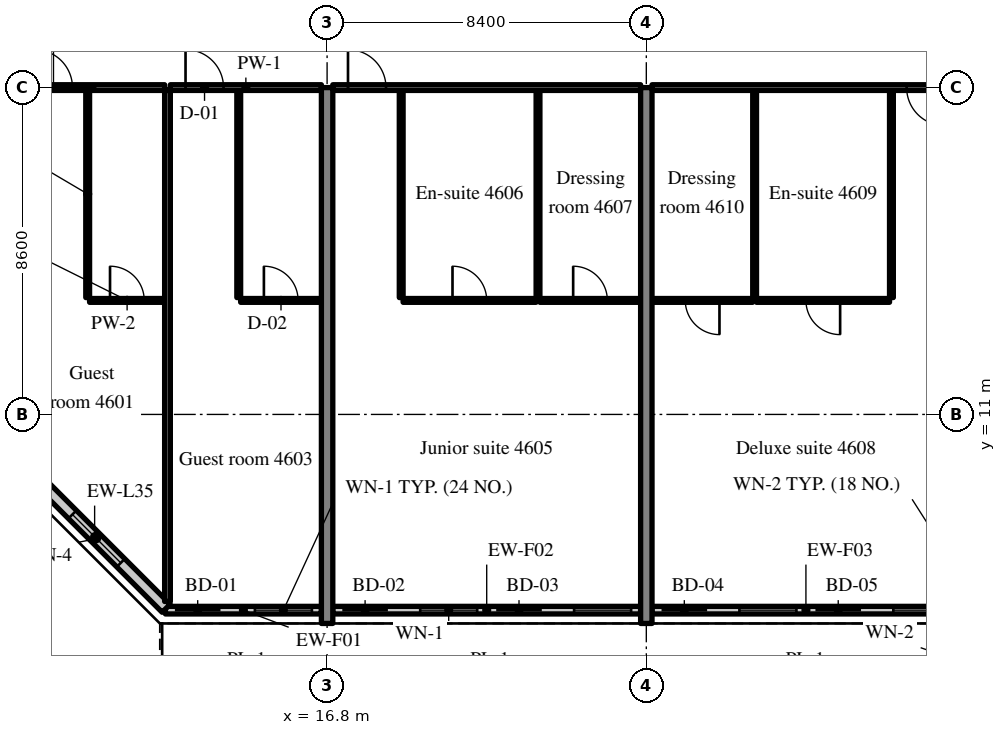
"""IFC4 building model, lengths in metres.
Left out: names, types, materials, properties, quantities, classifications, styles, units other than length and angle.
Written with IfcOpenShell. Run it as: python <this file> out.ifc"""

import sys

from ifc_helpers import new_model, si_unit, direction, frame, frame_2d, origin, place, context, subcontext, project, spatial, rectangle, extrude, source, transform, mapped, element, fill, save


model = new_model("IFC4")
c1 = context("Model", 3, precision=1e-05, world=origin(), true_north=direction((0.0, 1.0)))
c2 = subcontext(c1, "Body", "Model", "MODEL_VIEW")
j1 = project(units=[si_unit("LENGTHUNIT", "METRE"), si_unit("PLANEANGLEUNIT", "RADIAN")], contexts=[c1])
p1 = place(None, origin())
s1 = spatial("IfcSite", under=j1, at=p1, CompositionType="ELEMENT")
p2 = place(p1, origin())
s2 = spatial("IfcBuilding", under=s1, at=p2, CompositionType="ELEMENT")
p3 = place(p2, frame((0.0, 0.0, 189.6)))
s3 = spatial("IfcBuildingStorey", under=s2, at=p3, CompositionType="ELEMENT", Elevation=189.6)
m1 = source(origin(), c2, "Body", "SweptSolid", [
    extrude(rectangle(XDim=14.1, YDim=0.3, at=frame_2d((7.05, 0.0))), origin(), (0.0, 0.0, 1.0), 3.52),
])
for number, where, z_axis, x_axis in (
    (1, (16.8, 5.5, 0.0), (0.0, 0.0, 1.0), (0.0, 1.0, 0.0)),
    (2, (25.2, 5.5, 0.0), (0.0, 0.0, 1.0), (0.0, 1.0, 0.0)),
):
    element("IfcWall", number, at=place(p3, frame(where, z_axis=z_axis, x_axis=x_axis)), inside=s3, PredefinedType="SHEAR", context=c2, shape_type="MappedRepresentation", body=[
        mapped(m1, transform((0.0, 0.0, 0.0), scale=1.0)),
    ])
m2 = source(origin(), c2, "Body", "SweptSolid", [
    extrude(rectangle(XDim=4.105, YDim=0.2, at=frame_2d((2.052, 0.0))), origin(), (0.0, 0.0, 1.0), 2.87),
])
p4 = place(p3, frame((12.545, 5.85, 0.0), z_axis=(0.0, 0.0, 1.0), x_axis=(1.0, 0.0, 0.0)))
e3 = element("IfcWall", 3, at=p4, inside=s3, PredefinedType="SOLIDWALL", context=c2, shape_type="MappedRepresentation", body=[
    mapped(m2, transform((0.0, 0.0, 0.0), scale=1.0)),
])
m3 = source(origin(), c2, "Body", "SweptSolid", [
    extrude(rectangle(XDim=1.2, YDim=2.4, at=frame_2d((0.6, 1.2))), frame((0.0, 0.11, 0.0), z_axis=(0.0, -1.0, 0.0), x_axis=(1.0, 0.0, 0.0)), (0.0, 0.0, 1.0), 0.22),
])
p5 = place(p4, frame((0.25, 0.0, 0.0)))
e4 = element("IfcOpeningElement", 4, at=p5, cuts=e3, PredefinedType="OPENING", context=c2, shape_type="MappedRepresentation", body=[
    mapped(m3, transform((0.0, 0.0, 0.0), scale=1.0)),
])
m4 = source(origin(), c2, "Body", "SweptSolid", [
    extrude(rectangle(XDim=1.5, YDim=1.5, at=frame_2d((0.75, 0.75))), frame((0.0, 0.11, 0.0), z_axis=(0.0, -1.0, 0.0), x_axis=(1.0, 0.0, 0.0)), (0.0, 0.0, 1.0), 0.22),
])
p6 = place(p4, frame((2.355, 0.0, 0.9)))
e5 = element("IfcOpeningElement", 5, at=p6, cuts=e3, PredefinedType="OPENING", context=c2, shape_type="MappedRepresentation", body=[
    mapped(m4, transform((0.0, 0.0, 0.0), scale=1.0)),
])
m5 = source(origin(), c2, "Body", "SweptSolid", [
    extrude(rectangle(XDim=8.1, YDim=0.2, at=frame_2d((4.05, 0.0))), origin(), (0.0, 0.0, 1.0), 2.87),
])
p7 = place(p3, frame((16.95, 5.85, 0.0), z_axis=(0.0, 0.0, 1.0), x_axis=(1.0, 0.0, 0.0)))
e6 = element("IfcWall", 6, at=p7, inside=s3, PredefinedType="SOLIDWALL", context=c2, shape_type="MappedRepresentation", body=[
    mapped(m5, transform((0.0, 0.0, 0.0), scale=1.0)),
])
p8 = place(p7, frame((0.25, 0.0, 0.0)))
e7 = element("IfcOpeningElement", 7, at=p8, cuts=e6, PredefinedType="OPENING", context=c2, shape_type="MappedRepresentation", body=[
    mapped(m3, transform((0.0, 0.0, 0.0), scale=1.0)),
])
p9 = place(p7, frame((2.3, 0.0, 0.9)))
e8 = element("IfcOpeningElement", 8, at=p9, cuts=e6, PredefinedType="OPENING", context=c2, shape_type="MappedRepresentation", body=[
    mapped(m4, transform((0.0, 0.0, 0.0), scale=1.0)),
])
p10 = place(p7, frame((4.3, 0.0, 0.0)))
e9 = element("IfcOpeningElement", 9, at=p10, cuts=e6, PredefinedType="OPENING", context=c2, shape_type="MappedRepresentation", body=[
    mapped(m3, transform((0.0, 0.0, 0.0), scale=1.0)),
])
p11 = place(p7, frame((6.35, 0.0, 0.9)))
e10 = element("IfcOpeningElement", 10, at=p11, cuts=e6, PredefinedType="OPENING", context=c2, shape_type="MappedRepresentation", body=[
    mapped(m4, transform((0.0, 0.0, 0.0), scale=1.0)),
])
m6 = source(origin(), c2, "Body", "SweptSolid", [
    extrude(rectangle(XDim=8.1, YDim=0.2, at=frame_2d((4.05, 0.0))), origin(), (0.0, 0.0, 1.0), 2.87),
])
p12 = place(p3, frame((25.35, 5.85, 0.0), z_axis=(0.0, 0.0, 1.0), x_axis=(1.0, 0.0, 0.0)))
e11 = element("IfcWall", 11, at=p12, inside=s3, PredefinedType="SOLIDWALL", context=c2, shape_type="MappedRepresentation", body=[
    mapped(m6, transform((0.0, 0.0, 0.0), scale=1.0)),
])
p13 = place(p12, frame((0.25, 0.0, 0.0)))
e12 = element("IfcOpeningElement", 12, at=p13, cuts=e11, PredefinedType="OPENING", context=c2, shape_type="MappedRepresentation", body=[
    mapped(m3, transform((0.0, 0.0, 0.0), scale=1.0)),
])
p14 = place(p12, frame((2.3, 0.0, 0.9)))
e13 = element("IfcOpeningElement", 13, at=p14, cuts=e11, PredefinedType="OPENING", context=c2, shape_type="MappedRepresentation", body=[
    mapped(m4, transform((0.0, 0.0, 0.0), scale=1.0)),
])
p15 = place(p12, frame((4.3, 0.0, 0.0)))
e14 = element("IfcOpeningElement", 14, at=p15, cuts=e11, PredefinedType="OPENING", context=c2, shape_type="MappedRepresentation", body=[
    mapped(m3, transform((0.0, 0.0, 0.0), scale=1.0)),
])
p16 = place(p12, frame((6.35, 0.0, 0.9)))
e15 = element("IfcOpeningElement", 15, at=p16, cuts=e11, PredefinedType="OPENING", context=c2, shape_type="MappedRepresentation", body=[
    mapped(m4, transform((0.0, 0.0, 0.0), scale=1.0)),
])
m7 = source(origin(), c2, "Body", "SweptSolid", [
    extrude(rectangle(XDim=5.326, YDim=0.3, at=frame_2d((2.663, 0.0))), origin(), (0.0, 0.0, 1.0), 3.52),
])
p17 = place(p3, frame((8.8, 9.666, 0.0), z_axis=(0.0, 0.0, 1.0), x_axis=(0.707083859269, -0.707129702361, 0.0)))
e16 = element("IfcWall", 16, at=p17, inside=s3, PredefinedType="SOLIDWALL", context=c2, shape_type="MappedRepresentation", body=[
    mapped(m7, transform((0.0, 0.0, 0.0), scale=1.0)),
])
m8 = source(origin(), c2, "Body", "SweptSolid", [
    extrude(rectangle(XDim=1.8, YDim=1.5, at=frame_2d((0.9, 0.75))), frame((0.0, 0.16, 0.0), z_axis=(0.0, -1.0, 0.0), x_axis=(1.0, 0.0, 0.0)), (0.0, 0.0, 1.0), 0.32),
])
p18 = place(p17, frame((1.836, 0.0, 0.9)))
e17 = element("IfcOpeningElement", 17, at=p18, cuts=e16, PredefinedType="OPENING", context=c2, shape_type="MappedRepresentation", body=[
    mapped(m8, transform((0.0, 0.0, 0.0), scale=1.0)),
])
m9 = source(origin(), c2, "Body", "SweptSolid", [
    extrude(rectangle(XDim=5.45, YDim=0.1, at=frame_2d((2.725, 0.0))), origin(), (0.0, 0.0, 1.0), 3.52),
])
p19 = place(p3, frame((10.5, 14.075, 0.0), z_axis=(0.0, 0.0, 1.0), x_axis=(0.0, 1.0, 0.0)))
e18 = element("IfcWall", 18, at=p19, inside=s3, PredefinedType="PARTITIONING", context=c2, shape_type="MappedRepresentation", body=[
    mapped(m9, transform((0.0, 0.0, 0.0), scale=1.0)),
])
m10 = source(origin(), c2, "Body", "SweptSolid", [
    extrude(rectangle(XDim=1.975, YDim=0.1, at=frame_2d((0.987, 0.0))), origin(), (0.0, 0.0, 1.0), 3.52),
])
p20 = place(p3, frame((10.55, 14.0, 0.0), z_axis=(0.0, 0.0, 1.0), x_axis=(1.0, 0.0, 0.0)))
e19 = element("IfcWall", 19, at=p20, inside=s3, PredefinedType="PARTITIONING", context=c2, shape_type="MappedRepresentation", body=[
    mapped(m10, transform((0.0, 0.0, 0.0), scale=1.0)),
])
m11 = source(origin(), c2, "Body", "SweptSolid", [
    extrude(rectangle(XDim=0.9, YDim=2.1, at=frame_2d((0.45, 1.05))), frame((0.0, 0.06, 0.0), z_axis=(0.0, -1.0, 0.0), x_axis=(1.0, 0.0, 0.0)), (0.0, 0.0, 1.0), 0.12),
])
p21 = place(p20, frame((0.538, 0.0, 0.0)))
e20 = element("IfcOpeningElement", 20, at=p21, cuts=e19, PredefinedType="OPENING", context=c2, shape_type="MappedRepresentation", body=[
    mapped(m11, transform((0.0, 0.0, 0.0), scale=1.0)),
])
m12 = source(origin(), c2, "Body", "SweptSolid", [
    extrude(rectangle(XDim=3.825, YDim=0.15, at=frame_2d((1.913, 0.0))), origin(), (0.0, 0.0, 1.0), 2.82),
])
p22 = place(p3, frame((8.7, 19.6, 0.0), z_axis=(0.0, 0.0, 1.0), x_axis=(1.0, 0.0, 0.0)))
e21 = element("IfcWall", 21, at=p22, inside=s3, PredefinedType="PARTITIONING", context=c2, shape_type="MappedRepresentation", body=[
    mapped(m12, transform((0.0, 0.0, 0.0), scale=1.0)),
])
m13 = source(origin(), c2, "Body", "SweptSolid", [
    extrude(rectangle(XDim=1.0, YDim=2.1, at=frame_2d((0.5, 1.05))), frame((0.0, 0.085, 0.0), z_axis=(0.0, -1.0, 0.0), x_axis=(1.0, 0.0, 0.0)), (0.0, 0.0, 1.0), 0.17),
])
p23 = place(p22, frame((0.4, 0.0, 0.0)))
e22 = element("IfcOpeningElement", 22, at=p23, cuts=e21, PredefinedType="OPENING", context=c2, shape_type="MappedRepresentation", body=[
    mapped(m13, transform((0.0, 0.0, 0.0), scale=1.0)),
])
p24 = place(p3, frame((14.475, 14.075, 0.0), z_axis=(0.0, 0.0, 1.0), x_axis=(0.0, 1.0, 0.0)))
e23 = element("IfcWall", 23, at=p24, inside=s3, PredefinedType="PARTITIONING", context=c2, shape_type="MappedRepresentation", body=[
    mapped(m9, transform((0.0, 0.0, 0.0), scale=1.0)),
])
m14 = source(origin(), c2, "Body", "SweptSolid", [
    extrude(rectangle(XDim=2.125, YDim=0.1, at=frame_2d((1.062, 0.0))), origin(), (0.0, 0.0, 1.0), 3.52),
])
p25 = place(p3, frame((14.525, 14.0, 0.0), z_axis=(0.0, 0.0, 1.0), x_axis=(1.0, 0.0, 0.0)))
e24 = element("IfcWall", 24, at=p25, inside=s3, PredefinedType="PARTITIONING", context=c2, shape_type="MappedRepresentation", body=[
    mapped(m14, transform((0.0, 0.0, 0.0), scale=1.0)),
])
p26 = place(p25, frame((0.612, 0.0, 0.0)))
e25 = element("IfcOpeningElement", 25, at=p26, cuts=e24, PredefinedType="OPENING", context=c2, shape_type="MappedRepresentation", body=[
    mapped(m11, transform((0.0, 0.0, 0.0), scale=1.0)),
])
m15 = source(origin(), c2, "Body", "SweptSolid", [
    extrude(rectangle(XDim=3.975, YDim=0.15, at=frame_2d((1.987, 0.0))), origin(), (0.0, 0.0, 1.0), 2.82),
])
p27 = place(p3, frame((12.675, 19.6, 0.0), z_axis=(0.0, 0.0, 1.0), x_axis=(1.0, 0.0, 0.0)))
e26 = element("IfcWall", 26, at=p27, inside=s3, PredefinedType="PARTITIONING", context=c2, shape_type="MappedRepresentation", body=[
    mapped(m15, transform((0.0, 0.0, 0.0), scale=1.0)),
])
p28 = place(p27, frame((0.4, 0.0, 0.0)))
e27 = element("IfcOpeningElement", 27, at=p28, cuts=e26, PredefinedType="OPENING", context=c2, shape_type="MappedRepresentation", body=[
    mapped(m13, transform((0.0, 0.0, 0.0), scale=1.0)),
])
m16 = source(origin(), c2, "Body", "SweptSolid", [
    extrude(rectangle(XDim=13.447, YDim=0.15, at=frame_2d((6.724, 0.0))), origin(), (0.0, 0.0, 1.0), 3.52),
])
p29 = place(p3, frame((12.6, 6.078, 0.0), z_axis=(0.0, 0.0, 1.0), x_axis=(0.0, 1.0, 0.0)))
e28 = element("IfcWall", 28, at=p29, inside=s3, PredefinedType="PARTITIONING", context=c2, shape_type="MappedRepresentation", body=[
    mapped(m16, transform((0.0, 0.0, 0.0), scale=1.0)),
])
for number, where, z_axis, x_axis in (
    (29, (18.75, 14.075, 0.0), (0.0, 0.0, 1.0), (0.0, 1.0, 0.0)),
    (30, (22.35, 14.075, 0.0), (0.0, 0.0, 1.0), (0.0, 1.0, 0.0)),
):
    element("IfcWall", number, at=place(p3, frame(where, z_axis=z_axis, x_axis=x_axis)), inside=s3, PredefinedType="PARTITIONING", context=c2, shape_type="MappedRepresentation", body=[
        mapped(m9, transform((0.0, 0.0, 0.0), scale=1.0)),
    ])
m17 = source(origin(), c2, "Body", "SweptSolid", [
    extrude(rectangle(XDim=3.5, YDim=0.1, at=frame_2d((1.75, 0.0))), origin(), (0.0, 0.0, 1.0), 3.52),
])
p30 = place(p3, frame((18.8, 14.0, 0.0), z_axis=(0.0, 0.0, 1.0), x_axis=(1.0, 0.0, 0.0)))
e31 = element("IfcWall", 31, at=p30, inside=s3, PredefinedType="PARTITIONING", context=c2, shape_type="MappedRepresentation", body=[
    mapped(m17, transform((0.0, 0.0, 0.0), scale=1.0)),
])
p31 = place(p30, frame((1.3, 0.0, 0.0)))
e32 = element("IfcOpeningElement", 32, at=p31, cuts=e31, PredefinedType="OPENING", context=c2, shape_type="MappedRepresentation", body=[
    mapped(m11, transform((0.0, 0.0, 0.0), scale=1.0)),
])
m18 = source(origin(), c2, "Body", "SweptSolid", [
    extrude(rectangle(XDim=2.65, YDim=0.1, at=frame_2d((1.325, 0.0))), origin(), (0.0, 0.0, 1.0), 3.52),
])
p32 = place(p3, frame((22.4, 14.0, 0.0), z_axis=(0.0, 0.0, 1.0), x_axis=(1.0, 0.0, 0.0)))
e33 = element("IfcWall", 33, at=p32, inside=s3, PredefinedType="PARTITIONING", context=c2, shape_type="MappedRepresentation", body=[
    mapped(m18, transform((0.0, 0.0, 0.0), scale=1.0)),
])
p33 = place(p32, frame((0.875, 0.0, 0.0)))
e34 = element("IfcOpeningElement", 34, at=p33, cuts=e33, PredefinedType="OPENING", context=c2, shape_type="MappedRepresentation", body=[
    mapped(m11, transform((0.0, 0.0, 0.0), scale=1.0)),
])
m19 = source(origin(), c2, "Body", "SweptSolid", [
    extrude(rectangle(XDim=8.1, YDim=0.15, at=frame_2d((4.05, 0.0))), origin(), (0.0, 0.0, 1.0), 2.82),
])
p34 = place(p3, frame((16.95, 19.6, 0.0), z_axis=(0.0, 0.0, 1.0), x_axis=(1.0, 0.0, 0.0)))
e35 = element("IfcWall", 35, at=p34, inside=s3, PredefinedType="PARTITIONING", context=c2, shape_type="MappedRepresentation", body=[
    mapped(m19, transform((0.0, 0.0, 0.0), scale=1.0)),
])
p35 = place(p34, frame((0.4, 0.0, 0.0)))
e36 = element("IfcOpeningElement", 36, at=p35, cuts=e35, PredefinedType="OPENING", context=c2, shape_type="MappedRepresentation", body=[
    mapped(m13, transform((0.0, 0.0, 0.0), scale=1.0)),
])
for number, where, z_axis, x_axis in (
    (37, (31.65, 14.075, 0.0), (0.0, 0.0, 1.0), (0.0, 1.0, 0.0)),
    (38, (28.05, 14.075, 0.0), (0.0, 0.0, 1.0), (0.0, 1.0, 0.0)),
):
    element("IfcWall", number, at=place(p3, frame(where, z_axis=z_axis, x_axis=x_axis)), inside=s3, PredefinedType="PARTITIONING", context=c2, shape_type="MappedRepresentation", body=[
        mapped(m9, transform((0.0, 0.0, 0.0), scale=1.0)),
    ])
p36 = place(p3, frame((28.1, 14.0, 0.0), z_axis=(0.0, 0.0, 1.0), x_axis=(1.0, 0.0, 0.0)))
e39 = element("IfcWall", 39, at=p36, inside=s3, PredefinedType="PARTITIONING", context=c2, shape_type="MappedRepresentation", body=[
    mapped(m17, transform((0.0, 0.0, 0.0), scale=1.0)),
])
p37 = place(p36, frame((1.3, 0.0, 0.0)))
e40 = element("IfcOpeningElement", 40, at=p37, cuts=e39, PredefinedType="OPENING", context=c2, shape_type="MappedRepresentation", body=[
    mapped(m11, transform((0.0, 0.0, 0.0), scale=1.0)),
])
m20 = source(origin(), c2, "Body", "SweptSolid", [
    extrude(rectangle(XDim=2.65, YDim=0.1, at=frame_2d((1.325, 0.0))), origin(), (0.0, 0.0, 1.0), 3.52),
])
p38 = place(p3, frame((25.35, 14.0, 0.0), z_axis=(0.0, 0.0, 1.0), x_axis=(1.0, 0.0, 0.0)))
e41 = element("IfcWall", 41, at=p38, inside=s3, PredefinedType="PARTITIONING", context=c2, shape_type="MappedRepresentation", body=[
    mapped(m20, transform((0.0, 0.0, 0.0), scale=1.0)),
])
p39 = place(p38, frame((0.875, 0.0, 0.0)))
e42 = element("IfcOpeningElement", 42, at=p39, cuts=e41, PredefinedType="OPENING", context=c2, shape_type="MappedRepresentation", body=[
    mapped(m11, transform((0.0, 0.0, 0.0), scale=1.0)),
])
m21 = source(origin(), c2, "Body", "SweptSolid", [
    extrude(rectangle(XDim=8.1, YDim=0.15, at=frame_2d((4.05, 0.0))), origin(), (0.0, 0.0, 1.0), 2.82),
])
p40 = place(p3, frame((25.35, 19.6, 0.0), z_axis=(0.0, 0.0, 1.0), x_axis=(1.0, 0.0, 0.0)))
e43 = element("IfcWall", 43, at=p40, inside=s3, PredefinedType="PARTITIONING", context=c2, shape_type="MappedRepresentation", body=[
    mapped(m21, transform((0.0, 0.0, 0.0), scale=1.0)),
])
p41 = place(p40, frame((6.7, 0.0, 0.0)))
e44 = element("IfcOpeningElement", 44, at=p41, cuts=e43, PredefinedType="OPENING", context=c2, shape_type="MappedRepresentation", body=[
    mapped(m13, transform((0.0, 0.0, 0.0), scale=1.0)),
])
m22 = source(origin(), c2, "Body", "SweptSolid", [
    extrude(rectangle(XDim=1.2, YDim=2.4, at=frame_2d((0.6, 1.2))), frame((0.0, 0.025, 0.0), z_axis=(0.0, -1.0, 0.0), x_axis=(1.0, 0.0, 0.0)), (0.0, 0.0, 1.0), 0.05),
])
p42 = place(p5, origin())
e45 = element("IfcDoor", 45, at=p42, inside=s3, OperationType="SLIDING_TO_LEFT", PredefinedType="DOOR", context=c2, shape_type="MappedRepresentation", body=[
    mapped(m22, transform((0.0, 0.0, 0.0), scale=1.0)),
])
fill(e4, e45)
m23 = source(origin(), c2, "Body", "SweptSolid", [
    extrude(rectangle(XDim=1.5, YDim=1.5, at=frame_2d((0.75, 0.75))), frame((0.0, 0.03, 0.0), z_axis=(0.0, -1.0, 0.0), x_axis=(1.0, 0.0, 0.0)), (0.0, 0.0, 1.0), 0.06),
])
p43 = place(p6, origin())
e46 = element("IfcWindow", 46, at=p43, inside=s3, PartitioningType="SINGLE_PANEL", PredefinedType="WINDOW", context=c2, shape_type="MappedRepresentation", body=[
    mapped(m23, transform((0.0, 0.0, 0.0), scale=1.0)),
])
fill(e5, e46)
p44 = place(p8, origin())
e47 = element("IfcDoor", 47, at=p44, inside=s3, OperationType="SLIDING_TO_RIGHT", PredefinedType="DOOR", context=c2, shape_type="MappedRepresentation", body=[
    mapped(m22, transform((0.0, 0.0, 0.0), scale=1.0)),
])
fill(e7, e47)
p45 = place(p9, origin())
e48 = element("IfcWindow", 48, at=p45, inside=s3, PartitioningType="SINGLE_PANEL", PredefinedType="WINDOW", context=c2, shape_type="MappedRepresentation", body=[
    mapped(m23, transform((0.0, 0.0, 0.0), scale=1.0)),
])
fill(e8, e48)
p46 = place(p10, origin())
e49 = element("IfcDoor", 49, at=p46, inside=s3, OperationType="SLIDING_TO_LEFT", PredefinedType="DOOR", context=c2, shape_type="MappedRepresentation", body=[
    mapped(m22, transform((0.0, 0.0, 0.0), scale=1.0)),
])
fill(e9, e49)
p47 = place(p11, origin())
e50 = element("IfcWindow", 50, at=p47, inside=s3, PartitioningType="SINGLE_PANEL", PredefinedType="WINDOW", context=c2, shape_type="MappedRepresentation", body=[
    mapped(m23, transform((0.0, 0.0, 0.0), scale=1.0)),
])
fill(e10, e50)
p48 = place(p13, origin())
e51 = element("IfcDoor", 51, at=p48, inside=s3, OperationType="SLIDING_TO_RIGHT", PredefinedType="DOOR", context=c2, shape_type="MappedRepresentation", body=[
    mapped(m22, transform((0.0, 0.0, 0.0), scale=1.0)),
])
fill(e12, e51)
p49 = place(p14, origin())
e52 = element("IfcWindow", 52, at=p49, inside=s3, PartitioningType="SINGLE_PANEL", PredefinedType="WINDOW", context=c2, shape_type="MappedRepresentation", body=[
    mapped(m23, transform((0.0, 0.0, 0.0), scale=1.0)),
])
fill(e13, e52)
p50 = place(p15, origin())
e53 = element("IfcDoor", 53, at=p50, inside=s3, OperationType="SLIDING_TO_LEFT", PredefinedType="DOOR", context=c2, shape_type="MappedRepresentation", body=[
    mapped(m22, transform((0.0, 0.0, 0.0), scale=1.0)),
])
fill(e14, e53)
p51 = place(p16, origin())
e54 = element("IfcWindow", 54, at=p51, inside=s3, PartitioningType="SINGLE_PANEL", PredefinedType="WINDOW", context=c2, shape_type="MappedRepresentation", body=[
    mapped(m23, transform((0.0, 0.0, 0.0), scale=1.0)),
])
fill(e15, e54)
m24 = source(origin(), c2, "Body", "SweptSolid", [
    extrude(rectangle(XDim=1.8, YDim=1.5, at=frame_2d((0.9, 0.75))), frame((0.0, 0.03, 0.0), z_axis=(0.0, -1.0, 0.0), x_axis=(1.0, 0.0, 0.0)), (0.0, 0.0, 1.0), 0.06),
])
p52 = place(p18, origin())
e55 = element("IfcWindow", 55, at=p52, inside=s3, PartitioningType="SINGLE_PANEL", PredefinedType="WINDOW", context=c2, shape_type="MappedRepresentation", body=[
    mapped(m24, transform((0.0, 0.0, 0.0), scale=1.0)),
])
fill(e17, e55)
m25 = source(origin(), c2, "Body", "SweptSolid", [
    extrude(rectangle(XDim=0.9, YDim=2.1, at=frame_2d((0.45, 1.05))), frame((0.0, 0.025, 0.0), z_axis=(0.0, -1.0, 0.0), x_axis=(1.0, 0.0, 0.0)), (0.0, 0.0, 1.0), 0.05),
])
p53 = place(p21, origin())
e56 = element("IfcDoor", 56, at=p53, inside=s3, OperationType="SINGLE_SWING_LEFT", PredefinedType="DOOR", context=c2, shape_type="MappedRepresentation", body=[
    mapped(m25, transform((0.0, 0.0, 0.0), scale=1.0)),
])
fill(e20, e56)
m26 = source(origin(), c2, "Body", "SweptSolid", [
    extrude(rectangle(XDim=1.0, YDim=2.1, at=frame_2d((0.5, 1.05))), frame((0.0, 0.025, 0.0), z_axis=(0.0, -1.0, 0.0), x_axis=(1.0, 0.0, 0.0)), (0.0, 0.0, 1.0), 0.05),
])
p54 = place(p23, origin())
e57 = element("IfcDoor", 57, at=p54, inside=s3, OperationType="SINGLE_SWING_LEFT", PredefinedType="DOOR", context=c2, shape_type="MappedRepresentation", body=[
    mapped(m26, transform((0.0, 0.0, 0.0), scale=1.0)),
])
fill(e22, e57)
p55 = place(p26, origin())
e58 = element("IfcDoor", 58, at=p55, inside=s3, OperationType="SINGLE_SWING_LEFT", PredefinedType="DOOR", context=c2, shape_type="MappedRepresentation", body=[
    mapped(m25, transform((0.0, 0.0, 0.0), scale=1.0)),
])
fill(e25, e58)
p56 = place(p28, origin())
e59 = element("IfcDoor", 59, at=p56, inside=s3, OperationType="SINGLE_SWING_LEFT", PredefinedType="DOOR", context=c2, shape_type="MappedRepresentation", body=[
    mapped(m26, transform((0.0, 0.0, 0.0), scale=1.0)),
])
fill(e27, e59)
p57 = place(p31, origin())
e60 = element("IfcDoor", 60, at=p57, inside=s3, OperationType="SINGLE_SWING_LEFT", PredefinedType="DOOR", context=c2, shape_type="MappedRepresentation", body=[
    mapped(m25, transform((0.0, 0.0, 0.0), scale=1.0)),
])
fill(e32, e60)
p58 = place(p33, origin())
e61 = element("IfcDoor", 61, at=p58, inside=s3, OperationType="SINGLE_SWING_LEFT", PredefinedType="DOOR", context=c2, shape_type="MappedRepresentation", body=[
    mapped(m25, transform((0.0, 0.0, 0.0), scale=1.0)),
])
fill(e34, e61)
p59 = place(p35, origin())
e62 = element("IfcDoor", 62, at=p59, inside=s3, OperationType="SINGLE_SWING_LEFT", PredefinedType="DOOR", context=c2, shape_type="MappedRepresentation", body=[
    mapped(m26, transform((0.0, 0.0, 0.0), scale=1.0)),
])
fill(e36, e62)
p60 = place(p37, origin())
e63 = element("IfcDoor", 63, at=p60, inside=s3, OperationType="SINGLE_SWING_RIGHT", PredefinedType="DOOR", context=c2, shape_type="MappedRepresentation", body=[
    mapped(m25, transform((0.0, 0.0, 0.0), scale=1.0)),
])
fill(e40, e63)
p61 = place(p39, origin())
e64 = element("IfcDoor", 64, at=p61, inside=s3, OperationType="SINGLE_SWING_RIGHT", PredefinedType="DOOR", context=c2, shape_type="MappedRepresentation", body=[
    mapped(m25, transform((0.0, 0.0, 0.0), scale=1.0)),
])
fill(e42, e64)
p62 = place(p41, origin())
e65 = element("IfcDoor", 65, at=p62, inside=s3, OperationType="SINGLE_SWING_RIGHT", PredefinedType="DOOR", context=c2, shape_type="MappedRepresentation", body=[
    mapped(m26, transform((0.0, 0.0, 0.0), scale=1.0)),
])
fill(e44, e65)
save(model, sys.argv[1])
